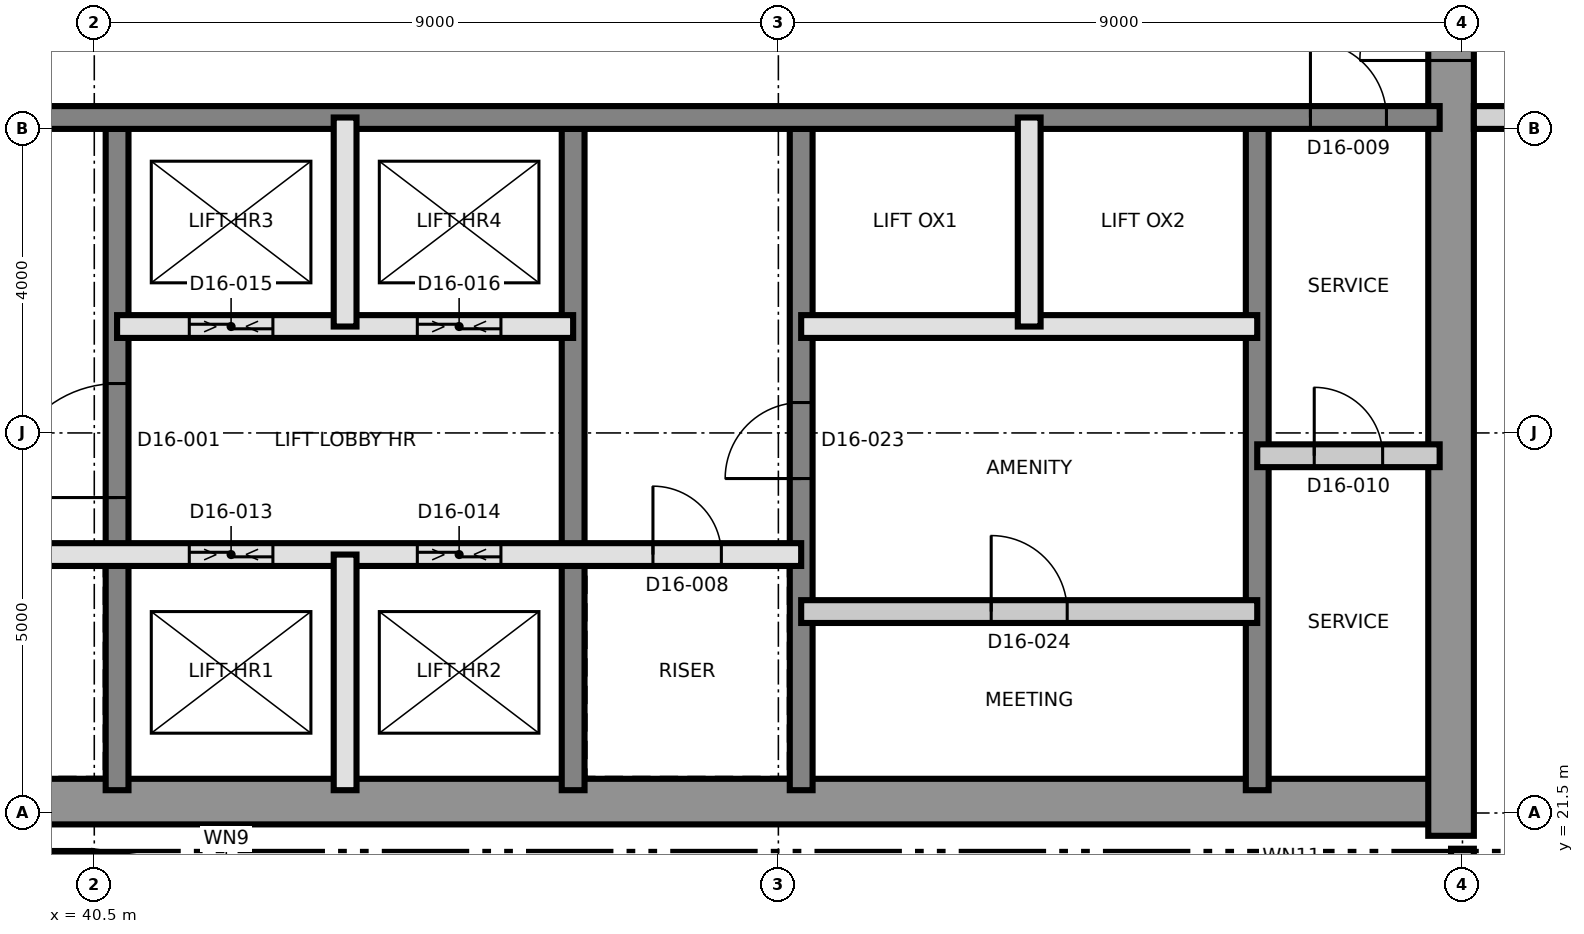
"""IFC4 building model, lengths in metres.
Left out: names, types, materials, properties, quantities, classifications, styles, units other than length and angle.
Written with IfcOpenShell. Run it as: python <this file> out.ifc"""

import sys

from ifc_helpers import new_model, si_unit, direction, frame, frame_2d, origin, place, context, subcontext, project, spatial, rectangle, extrude, element, fill, save


model = new_model("IFC4")
c1 = context("Model", 3, precision=1e-05, world=origin(), true_north=direction((0.0, 1.0)))
c2 = subcontext(c1, "Body", "Model", "MODEL_VIEW")
j1 = project(units=[si_unit("LENGTHUNIT", "METRE"), si_unit("PLANEANGLEUNIT", "RADIAN")], contexts=[c1])
p1 = place(None, origin())
s1 = spatial("IfcSite", under=j1, at=p1, CompositionType="ELEMENT")
p2 = place(p1, origin())
s2 = spatial("IfcBuilding", under=s1, at=p2, CompositionType="ELEMENT")
p3 = place(p2, frame((0.0, 0.0, 168.1)))
s3 = spatial("IfcBuildingStorey", under=s2, at=p3, CompositionType="ELEMENT", Elevation=168.1)
p4 = place(p3, frame((31.2, 21.65, 0.0), z_axis=(0.0, 0.0, 1.0), x_axis=(1.0, 0.0, 0.0)))
e1 = element("IfcWall", 1, at=p4, inside=s3, PredefinedType="SHEAR", context=c2, shape_type="SweptSolid", body=[
    extrude(rectangle(XDim=27.0, YDim=0.6, at=frame_2d((13.5, 0.0))), origin(), (0.0, 0.0, 1.0), 3.7),
])
p5 = place(p3, frame((58.35, 21.2, 0.0), z_axis=(0.0, 0.0, 1.0), x_axis=(0.0, 1.0, 0.0)))
e2 = element("IfcWall", 2, at=p5, inside=s3, PredefinedType="SHEAR", context=c2, shape_type="SweptSolid", body=[
    extrude(rectangle(XDim=18.6, YDim=0.6, at=frame_2d((9.3, 0.0))), origin(), (0.0, 0.0, 1.0), 3.7),
])
p6 = place(p5, frame((10.2, 0.0, 0.0)))
e3 = element("IfcOpeningElement", 3, at=p6, cuts=e2, PredefinedType="OPENING", context=c2, shape_type="SweptSolid", body=[
    extrude(rectangle(XDim=1.2, YDim=2.1, at=frame_2d((0.6, 1.05))), frame((0.0, 0.31, 0.0), z_axis=(0.0, -1.0, 0.0), x_axis=(1.0, 0.0, 0.0)), (0.0, 0.0, 1.0), 0.62),
])
p7 = place(p3, frame((40.8, 21.8, 0.0), z_axis=(0.0, 0.0, 1.0), x_axis=(0.0, 1.0, 0.0)))
e4 = element("IfcWall", 4, at=p7, inside=s3, PredefinedType="SHEAR", context=c2, shape_type="SweptSolid", body=[
    extrude(rectangle(XDim=8.7, YDim=0.3, at=frame_2d((4.35, 0.0))), origin(), (0.0, 0.0, 1.0), 3.7),
])
p8 = place(p7, frame((3.85, 0.0, 0.0)))
e5 = element("IfcOpeningElement", 5, at=p8, cuts=e4, PredefinedType="OPENING", context=c2, shape_type="SweptSolid", body=[
    extrude(rectangle(XDim=1.5, YDim=2.1, at=frame_2d((0.75, 1.05))), frame((0.0, 0.16, 0.0), z_axis=(0.0, -1.0, 0.0), x_axis=(1.0, 0.0, 0.0)), (0.0, 0.0, 1.0), 0.32),
])
p9 = place(p3, frame((46.8, 21.8, 0.0), z_axis=(0.0, 0.0, 1.0), x_axis=(0.0, 1.0, 0.0)))
e6 = element("IfcWall", 6, at=p9, inside=s3, PredefinedType="SHEAR", context=c2, shape_type="SweptSolid", body=[
    extrude(rectangle(XDim=8.7, YDim=0.3, at=frame_2d((4.35, 0.0))), origin(), (0.0, 0.0, 1.0), 3.7),
])
p10 = place(p3, frame((49.8, 21.8, 0.0), z_axis=(0.0, 0.0, 1.0), x_axis=(0.0, 1.0, 0.0)))
e7 = element("IfcWall", 7, at=p10, inside=s3, PredefinedType="SHEAR", context=c2, shape_type="SweptSolid", body=[
    extrude(rectangle(XDim=8.7, YDim=0.3, at=frame_2d((4.35, 0.0))), origin(), (0.0, 0.0, 1.0), 3.7),
])
p11 = place(p10, frame((4.1, 0.0, 0.0)))
e8 = element("IfcOpeningElement", 8, at=p11, cuts=e7, PredefinedType="OPENING", context=c2, shape_type="SweptSolid", body=[
    extrude(rectangle(XDim=1.0, YDim=2.1, at=frame_2d((0.5, 1.05))), frame((0.0, 0.16, 0.0), z_axis=(0.0, -1.0, 0.0), x_axis=(1.0, 0.0, 0.0)), (0.0, 0.0, 1.0), 0.32),
])
p12 = place(p3, frame((55.8, 21.8, 0.0), z_axis=(0.0, 0.0, 1.0), x_axis=(0.0, 1.0, 0.0)))
e9 = element("IfcWall", 9, at=p12, inside=s3, PredefinedType="SHEAR", context=c2, shape_type="SweptSolid", body=[
    extrude(rectangle(XDim=8.7, YDim=0.3, at=frame_2d((4.35, 0.0))), origin(), (0.0, 0.0, 1.0), 3.7),
])
p13 = place(p3, frame((31.8, 30.65, 0.0), z_axis=(0.0, 0.0, 1.0), x_axis=(1.0, 0.0, 0.0)))
e10 = element("IfcWall", 10, at=p13, inside=s3, PredefinedType="SHEAR", context=c2, shape_type="SweptSolid", body=[
    extrude(rectangle(XDim=26.4, YDim=0.3, at=frame_2d((13.2, 0.0))), origin(), (0.0, 0.0, 1.0), 3.7),
])
p14 = place(p13, frame((24.7, 0.0, 0.0)))
e11 = element("IfcOpeningElement", 11, at=p14, cuts=e10, PredefinedType="OPENING", context=c2, shape_type="SweptSolid", body=[
    extrude(rectangle(XDim=1.0, YDim=2.1, at=frame_2d((0.5, 1.05))), frame((0.0, 0.16, 0.0), z_axis=(0.0, -1.0, 0.0), x_axis=(1.0, 0.0, 0.0)), (0.0, 0.0, 1.0), 0.32),
])
p15 = place(p13, frame((4.0, 0.0, 0.0)))
e12 = element("IfcOpeningElement", 12, at=p15, cuts=e10, PredefinedType="OPENING", context=c2, shape_type="SweptSolid", body=[
    extrude(rectangle(XDim=1.0, YDim=2.1, at=frame_2d((0.5, 1.05))), frame((0.0, 0.16, 0.0), z_axis=(0.0, -1.0, 0.0), x_axis=(1.0, 0.0, 0.0)), (0.0, 0.0, 1.0), 0.32),
])
p16 = place(p3, frame((31.36, 20.85, 0.0), z_axis=(0.0, 0.0, 1.0), x_axis=(1.0, 0.0, 0.0)))
e13 = element("IfcWall", 13, at=p16, inside=s3, PredefinedType="SOLIDWALL", context=c2, shape_type="SweptSolid", body=[
    extrude(rectangle(XDim=9.094, YDim=0.3, at=frame_2d((4.547, 0.0))), origin(), (0.0, 0.0, 1.0), 3.4),
])
p17 = place(p3, frame((40.474, 20.849, 0.0), z_axis=(0.0, 0.0, 1.0), x_axis=(0.990778329255, -0.135492812649, 0.0)))
e14 = element("IfcWall", 14, at=p17, inside=s3, PredefinedType="SOLIDWALL", context=c2, shape_type="SweptSolid", body=[
    extrude(rectangle(XDim=3.559, YDim=0.3, at=frame_2d((1.779, 0.0))), origin(), (0.0, 0.0, 1.0), 3.4),
])
p18 = place(p17, frame((1.179, 0.0, 0.9)))
e15 = element("IfcOpeningElement", 15, at=p18, cuts=e14, PredefinedType="OPENING", context=c2, shape_type="SweptSolid", body=[
    extrude(rectangle(XDim=1.2, YDim=1.5, at=frame_2d((0.6, 0.75))), frame((0.0, 0.16, 0.0), z_axis=(0.0, -1.0, 0.0), x_axis=(1.0, 0.0, 0.0)), (0.0, 0.0, 1.0), 0.32),
])
p19 = place(p3, frame((49.8, 24.15, 0.0), z_axis=(0.0, 0.0, 1.0), x_axis=(1.0, 0.0, 0.0)))
e16 = element("IfcWall", 16, at=p19, inside=s3, PredefinedType="PARTITIONING", context=c2, shape_type="SweptSolid", body=[
    extrude(rectangle(XDim=6.0, YDim=0.3, at=frame_2d((3.0, 0.0))), origin(), (0.0, 0.0, 1.0), 3.4),
])
p20 = place(p19, frame((2.5, 0.0, 0.0)))
e17 = element("IfcOpeningElement", 17, at=p20, cuts=e16, PredefinedType="OPENING", context=c2, shape_type="SweptSolid", body=[
    extrude(rectangle(XDim=1.0, YDim=2.1, at=frame_2d((0.5, 1.05))), frame((0.0, 0.16, 0.0), z_axis=(0.0, -1.0, 0.0), x_axis=(1.0, 0.0, 0.0)), (0.0, 0.0, 1.0), 0.32),
])
p21 = place(p3, frame((37.8, 24.9, 0.0), z_axis=(0.0, 0.0, 1.0), x_axis=(1.0, 0.0, 0.0)))
e18 = element("IfcWall", 18, at=p21, inside=s3, PredefinedType="SOLIDWALL", context=c2, shape_type="SweptSolid", body=[
    extrude(rectangle(XDim=12.0, YDim=0.3, at=frame_2d((6.0, 0.0))), origin(), (0.0, 0.0, 1.0), 3.4),
])
p22 = place(p21, frame((1.05, 0.0, 0.0)))
e19 = element("IfcOpeningElement", 19, at=p22, cuts=e18, PredefinedType="OPENING", context=c2, shape_type="SweptSolid", body=[
    extrude(rectangle(XDim=0.9, YDim=2.1, at=frame_2d((0.45, 1.05))), frame((0.0, 0.16, 0.0), z_axis=(0.0, -1.0, 0.0), x_axis=(1.0, 0.0, 0.0)), (0.0, 0.0, 1.0), 0.32),
])
p23 = place(p21, frame((10.05, 0.0, 0.0)))
e20 = element("IfcOpeningElement", 20, at=p23, cuts=e18, PredefinedType="OPENING", context=c2, shape_type="SweptSolid", body=[
    extrude(rectangle(XDim=0.9, YDim=2.1, at=frame_2d((0.45, 1.05))), frame((0.0, 0.16, 0.0), z_axis=(0.0, -1.0, 0.0), x_axis=(1.0, 0.0, 0.0)), (0.0, 0.0, 1.0), 0.32),
])
p24 = place(p21, frame((3.95, 0.0, 0.0)))
e21 = element("IfcOpeningElement", 21, at=p24, cuts=e18, PredefinedType="OPENING", context=c2, shape_type="SweptSolid", body=[
    extrude(rectangle(XDim=1.1, YDim=2.4, at=frame_2d((0.55, 1.2))), frame((0.0, 0.16, 0.0), z_axis=(0.0, -1.0, 0.0), x_axis=(1.0, 0.0, 0.0)), (0.0, 0.0, 1.0), 0.32),
])
p25 = place(p21, frame((6.95, 0.0, 0.0)))
e22 = element("IfcOpeningElement", 22, at=p25, cuts=e18, PredefinedType="OPENING", context=c2, shape_type="SweptSolid", body=[
    extrude(rectangle(XDim=1.1, YDim=2.4, at=frame_2d((0.55, 1.2))), frame((0.0, 0.16, 0.0), z_axis=(0.0, -1.0, 0.0), x_axis=(1.0, 0.0, 0.0)), (0.0, 0.0, 1.0), 0.32),
])
p26 = place(p3, frame((55.8, 26.2, 0.0), z_axis=(0.0, 0.0, 1.0), x_axis=(1.0, 0.0, 0.0)))
e23 = element("IfcWall", 23, at=p26, inside=s3, PredefinedType="PARTITIONING", context=c2, shape_type="SweptSolid", body=[
    extrude(rectangle(XDim=2.4, YDim=0.3, at=frame_2d((1.2, 0.0))), origin(), (0.0, 0.0, 1.0), 3.4),
])
p27 = place(p26, frame((0.75, 0.0, 0.0)))
e24 = element("IfcOpeningElement", 24, at=p27, cuts=e23, PredefinedType="OPENING", context=c2, shape_type="SweptSolid", body=[
    extrude(rectangle(XDim=0.9, YDim=2.1, at=frame_2d((0.45, 1.05))), frame((0.0, 0.16, 0.0), z_axis=(0.0, -1.0, 0.0), x_axis=(1.0, 0.0, 0.0)), (0.0, 0.0, 1.0), 0.32),
])
p28 = place(p3, frame((40.8, 27.9, 0.0), z_axis=(0.0, 0.0, 1.0), x_axis=(1.0, 0.0, 0.0)))
e25 = element("IfcWall", 25, at=p28, inside=s3, PredefinedType="SOLIDWALL", context=c2, shape_type="SweptSolid", body=[
    extrude(rectangle(XDim=6.0, YDim=0.3, at=frame_2d((3.0, 0.0))), origin(), (0.0, 0.0, 1.0), 3.4),
])
p29 = place(p28, frame((0.95, 0.0, 0.0)))
e26 = element("IfcOpeningElement", 26, at=p29, cuts=e25, PredefinedType="OPENING", context=c2, shape_type="SweptSolid", body=[
    extrude(rectangle(XDim=1.1, YDim=2.4, at=frame_2d((0.55, 1.2))), frame((0.0, 0.16, 0.0), z_axis=(0.0, -1.0, 0.0), x_axis=(1.0, 0.0, 0.0)), (0.0, 0.0, 1.0), 0.32),
])
p30 = place(p28, frame((3.95, 0.0, 0.0)))
e27 = element("IfcOpeningElement", 27, at=p30, cuts=e25, PredefinedType="OPENING", context=c2, shape_type="SweptSolid", body=[
    extrude(rectangle(XDim=1.1, YDim=2.4, at=frame_2d((0.55, 1.2))), frame((0.0, 0.16, 0.0), z_axis=(0.0, -1.0, 0.0), x_axis=(1.0, 0.0, 0.0)), (0.0, 0.0, 1.0), 0.32),
])
p31 = place(p3, frame((49.8, 27.9, 0.0), z_axis=(0.0, 0.0, 1.0), x_axis=(1.0, 0.0, 0.0)))
e28 = element("IfcWall", 28, at=p31, inside=s3, PredefinedType="SOLIDWALL", context=c2, shape_type="SweptSolid", body=[
    extrude(rectangle(XDim=6.0, YDim=0.3, at=frame_2d((3.0, 0.0))), origin(), (0.0, 0.0, 1.0), 3.4),
])
p32 = place(p3, frame((43.8, 21.8, 0.0), z_axis=(0.0, 0.0, 1.0), x_axis=(0.0, 1.0, 0.0)))
e29 = element("IfcWall", 29, at=p32, inside=s3, PredefinedType="SOLIDWALL", context=c2, shape_type="SweptSolid", body=[
    extrude(rectangle(XDim=3.1, YDim=0.3, at=frame_2d((1.55, 0.0))), origin(), (0.0, 0.0, 1.0), 3.4),
])
for number, where, z_axis, x_axis in (
    (30, (43.8, 27.9, 0.0), (0.0, 0.0, 1.0), (0.0, 1.0, 0.0)),
    (31, (52.8, 27.9, 0.0), (0.0, 0.0, 1.0), (0.0, 1.0, 0.0)),
):
    element("IfcWall", number, at=place(p3, frame(where, z_axis=z_axis, x_axis=x_axis)), inside=s3, PredefinedType="SOLIDWALL", context=c2, shape_type="SweptSolid", body=[
        extrude(rectangle(XDim=2.75, YDim=0.3, at=frame_2d((1.375, 0.0))), origin(), (0.0, 0.0, 1.0), 3.4),
    ])
p33 = place(p3, frame((58.65, 30.65, 0.0), z_axis=(0.0, 0.0, 1.0), x_axis=(1.0, 0.0, 0.0)))
e32 = element("IfcWall", 32, at=p33, inside=s3, PredefinedType="PARTITIONING", context=c2, shape_type="SweptSolid", body=[
    extrude(rectangle(XDim=8.5, YDim=0.3, at=frame_2d((4.25, 0.0))), origin(), (0.0, 0.0, 1.0), 3.4),
])
p34 = place(p33, frame((0.919, 0.0, 0.0)))
e33 = element("IfcOpeningElement", 33, at=p34, cuts=e32, PredefinedType="OPENING", context=c2, shape_type="SweptSolid", body=[
    extrude(rectangle(XDim=1.2, YDim=2.1, at=frame_2d((0.6, 1.05))), frame((0.0, 0.16, 0.0), z_axis=(0.0, -1.0, 0.0), x_axis=(1.0, 0.0, 0.0)), (0.0, 0.0, 1.0), 0.32),
])
p35 = place(p33, frame((3.969, 0.0, 0.0)))
e34 = element("IfcOpeningElement", 34, at=p35, cuts=e32, PredefinedType="OPENING", context=c2, shape_type="SweptSolid", body=[
    extrude(rectangle(XDim=1.0, YDim=2.1, at=frame_2d((0.5, 1.05))), frame((0.0, 0.16, 0.0), z_axis=(0.0, -1.0, 0.0), x_axis=(1.0, 0.0, 0.0)), (0.0, 0.0, 1.0), 0.32),
])
p36 = place(p3, frame((58.5, 20.565, 0.0), z_axis=(0.0, 0.0, 1.0), x_axis=(0.0, 1.0, 0.0)))
e35 = element("IfcWall", 35, at=p36, inside=s3, PredefinedType="PARTITIONING", context=c2, shape_type="SweptSolid", body=[
    extrude(rectangle(XDim=0.465, YDim=0.3, at=frame_2d((0.232, 0.0))), origin(), (0.0, 0.0, 1.0), 3.4),
])
p37 = place(p8, origin())
e36 = element("IfcDoor", 36, at=p37, inside=s3, OperationType="SINGLE_SWING_RIGHT", PredefinedType="DOOR", context=c2, shape_type="SweptSolid", body=[
    extrude(rectangle(XDim=1.5, YDim=2.1, at=frame_2d((0.75, 1.05))), frame((0.0, 0.025, 0.0), z_axis=(0.0, -1.0, 0.0), x_axis=(1.0, 0.0, 0.0)), (0.0, 0.0, 1.0), 0.05),
])
fill(e5, e36)
p38 = place(p23, origin())
e37 = element("IfcDoor", 37, at=p38, inside=s3, OperationType="SINGLE_SWING_RIGHT", PredefinedType="DOOR", context=c2, shape_type="SweptSolid", body=[
    extrude(rectangle(XDim=0.9, YDim=2.1, at=frame_2d((0.45, 1.05))), frame((0.0, 0.025, 0.0), z_axis=(0.0, -1.0, 0.0), x_axis=(1.0, 0.0, 0.0)), (0.0, 0.0, 1.0), 0.05),
])
fill(e20, e37)
p39 = place(p14, origin())
e38 = element("IfcDoor", 38, at=p39, inside=s3, OperationType="SINGLE_SWING_LEFT", PredefinedType="DOOR", context=c2, shape_type="SweptSolid", body=[
    extrude(rectangle(XDim=1.0, YDim=2.1, at=frame_2d((0.5, 1.05))), frame((0.0, 0.025, 0.0), z_axis=(0.0, -1.0, 0.0), x_axis=(1.0, 0.0, 0.0)), (0.0, 0.0, 1.0), 0.05),
])
fill(e11, e38)
p40 = place(p27, origin())
e39 = element("IfcDoor", 39, at=p40, inside=s3, OperationType="SINGLE_SWING_RIGHT", PredefinedType="DOOR", context=c2, shape_type="SweptSolid", body=[
    extrude(rectangle(XDim=0.9, YDim=2.1, at=frame_2d((0.45, 1.05))), frame((0.0, 0.025, 0.0), z_axis=(0.0, -1.0, 0.0), x_axis=(1.0, 0.0, 0.0)), (0.0, 0.0, 1.0), 0.05),
])
fill(e24, e39)
p41 = place(p6, origin())
e40 = element("IfcDoor", 40, at=p41, inside=s3, OperationType="SINGLE_SWING_LEFT", PredefinedType="DOOR", context=c2, shape_type="SweptSolid", body=[
    extrude(rectangle(XDim=1.2, YDim=2.1, at=frame_2d((0.6, 1.05))), frame((0.0, 0.025, 0.0), z_axis=(0.0, -1.0, 0.0), x_axis=(1.0, 0.0, 0.0)), (0.0, 0.0, 1.0), 0.05),
])
fill(e3, e40)
p42 = place(p24, origin())
e41 = element("IfcDoor", 41, at=p42, inside=s3, OperationType="SLIDING_TO_LEFT", PredefinedType="DOOR", context=c2, shape_type="SweptSolid", body=[
    extrude(rectangle(XDim=1.1, YDim=2.4, at=frame_2d((0.55, 1.2))), frame((0.0, 0.025, 0.0), z_axis=(0.0, -1.0, 0.0), x_axis=(1.0, 0.0, 0.0)), (0.0, 0.0, 1.0), 0.05),
])
fill(e21, e41)
p43 = place(p25, origin())
e42 = element("IfcDoor", 42, at=p43, inside=s3, OperationType="SLIDING_TO_LEFT", PredefinedType="DOOR", context=c2, shape_type="SweptSolid", body=[
    extrude(rectangle(XDim=1.1, YDim=2.4, at=frame_2d((0.55, 1.2))), frame((0.0, 0.025, 0.0), z_axis=(0.0, -1.0, 0.0), x_axis=(1.0, 0.0, 0.0)), (0.0, 0.0, 1.0), 0.05),
])
fill(e22, e42)
p44 = place(p29, origin())
e43 = element("IfcDoor", 43, at=p44, inside=s3, OperationType="SLIDING_TO_LEFT", PredefinedType="DOOR", context=c2, shape_type="SweptSolid", body=[
    extrude(rectangle(XDim=1.1, YDim=2.4, at=frame_2d((0.55, 1.2))), frame((0.0, 0.025, 0.0), z_axis=(0.0, -1.0, 0.0), x_axis=(1.0, 0.0, 0.0)), (0.0, 0.0, 1.0), 0.05),
])
fill(e26, e43)
p45 = place(p30, origin())
e44 = element("IfcDoor", 44, at=p45, inside=s3, OperationType="SLIDING_TO_LEFT", PredefinedType="DOOR", context=c2, shape_type="SweptSolid", body=[
    extrude(rectangle(XDim=1.1, YDim=2.4, at=frame_2d((0.55, 1.2))), frame((0.0, 0.025, 0.0), z_axis=(0.0, -1.0, 0.0), x_axis=(1.0, 0.0, 0.0)), (0.0, 0.0, 1.0), 0.05),
])
fill(e27, e44)
p46 = place(p11, origin())
e45 = element("IfcDoor", 45, at=p46, inside=s3, OperationType="SINGLE_SWING_LEFT", PredefinedType="DOOR", context=c2, shape_type="SweptSolid", body=[
    extrude(rectangle(XDim=1.0, YDim=2.1, at=frame_2d((0.5, 1.05))), frame((0.0, 0.025, 0.0), z_axis=(0.0, -1.0, 0.0), x_axis=(1.0, 0.0, 0.0)), (0.0, 0.0, 1.0), 0.05),
])
fill(e8, e45)
p47 = place(p20, origin())
e46 = element("IfcDoor", 46, at=p47, inside=s3, OperationType="SINGLE_SWING_RIGHT", PredefinedType="DOOR", context=c2, shape_type="SweptSolid", body=[
    extrude(rectangle(XDim=1.0, YDim=2.1, at=frame_2d((0.5, 1.05))), frame((0.0, 0.025, 0.0), z_axis=(0.0, -1.0, 0.0), x_axis=(1.0, 0.0, 0.0)), (0.0, 0.0, 1.0), 0.05),
])
fill(e17, e46)
save(model, sys.argv[1])
